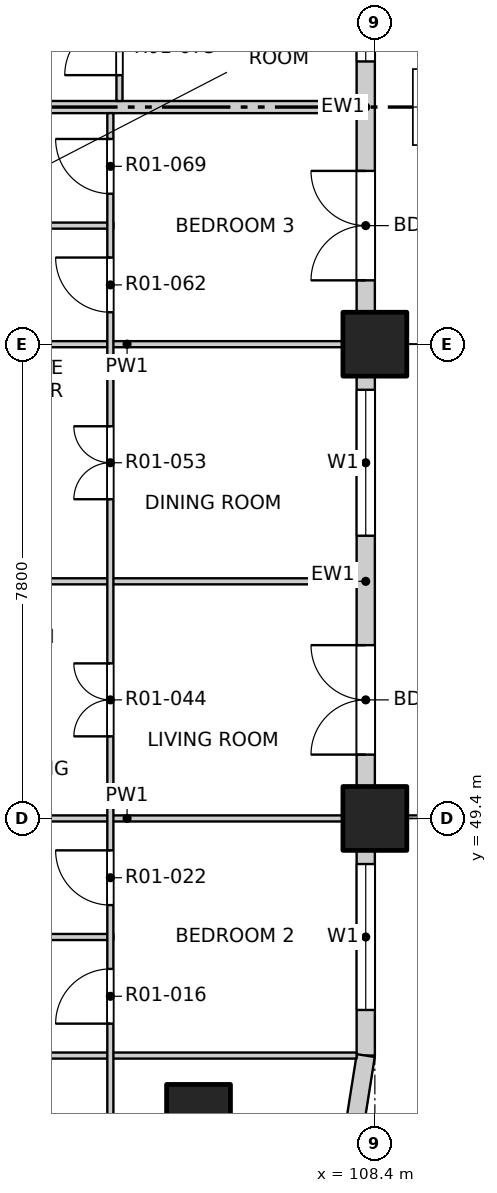
"""IFC4 building model, lengths in metres.
Left out: names, types, materials, properties, quantities, classifications, styles, units other than length and angle.
Written with IfcOpenShell. Run it as: python <this file> out.ifc"""

import sys

from ifc_helpers import new_model, si_unit, direction, frame, frame_2d, origin, origin_2d, place, context, subcontext, project, spatial, rectangle, extrude, element, fill, save


model = new_model("IFC4")
c1 = context("Model", 3, precision=1e-05, world=origin(), true_north=direction((0.0, 1.0)))
c2 = subcontext(c1, "Body", "Model", "MODEL_VIEW")
j1 = project(units=[si_unit("LENGTHUNIT", "METRE"), si_unit("PLANEANGLEUNIT", "RADIAN")], contexts=[c1])
p1 = place(None, origin())
s1 = spatial("IfcSite", under=j1, at=p1, CompositionType="ELEMENT")
p2 = place(p1, origin())
s2 = spatial("IfcBuilding", under=s1, at=p2, CompositionType="ELEMENT")
p3 = place(p2, frame((0.0, 0.0, 19.5)))
s3 = spatial("IfcBuildingStorey", under=s2, at=p3, CompositionType="ELEMENT", Elevation=19.5)
for number, where, z_axis, x_axis in (
    (1, (105.5, 44.5, -0.25), (0.0, 0.0, 1.0), (1.0, 0.0, 0.0)),
    (2, (108.4, 49.4, -0.25), (0.0, 0.0, 1.0), (1.0, 0.0, 0.0)),
    (3, (108.4, 57.2, -0.25), (0.0, 0.0, 1.0), (1.0, 0.0, 0.0)),
):
    element("IfcColumn", number, at=place(p3, frame(where, z_axis=z_axis, x_axis=x_axis)), inside=s3, PredefinedType="COLUMN", context=c2, shape_type="SweptSolid", body=[
        extrude(rectangle(XDim=1.05, YDim=1.05, at=origin_2d()), origin(), (0.0, 0.0, 1.0), 3.4),
    ])
p4 = place(p3, frame((108.25, 45.5, 0.0), z_axis=(0.0, 0.0, 1.0), x_axis=(0.0, 1.0, 0.0)))
e4 = element("IfcWall", 4, at=p4, inside=s3, PredefinedType="SOLIDWALL", context=c2, shape_type="SweptSolid", body=[
    extrude(rectangle(XDim=3.375, YDim=0.3, at=frame_2d((1.688, 0.0))), origin(), (0.0, 0.0, 1.0), 2.7),
])
p5 = place(p4, frame((0.75, 0.0, 0.9)))
e5 = element("IfcOpeningElement", 5, at=p5, cuts=e4, PredefinedType="OPENING", context=c2, shape_type="SweptSolid", body=[
    extrude(rectangle(XDim=2.4, YDim=1.8, at=frame_2d((1.2, 0.9))), frame((0.0, 0.16, 0.0), z_axis=(0.0, -1.0, 0.0), x_axis=(1.0, 0.0, 0.0)), (0.0, 0.0, 1.0), 0.32),
])
p6 = place(p3, frame((108.25, 49.925, 0.0), z_axis=(0.0, 0.0, 1.0), x_axis=(0.0, 1.0, 0.0)))
e6 = element("IfcWall", 6, at=p6, inside=s3, PredefinedType="SOLIDWALL", context=c2, shape_type="SweptSolid", body=[
    extrude(rectangle(XDim=6.75, YDim=0.3, at=frame_2d((3.375, 0.0))), origin(), (0.0, 0.0, 1.0), 2.7),
])
p7 = place(p6, frame((0.525, 0.0, 0.0)))
e7 = element("IfcOpeningElement", 7, at=p7, cuts=e6, PredefinedType="OPENING", context=c2, shape_type="SweptSolid", body=[
    extrude(rectangle(XDim=1.8, YDim=2.4, at=frame_2d((0.9, 1.2))), frame((0.0, 0.16, 0.0), z_axis=(0.0, -1.0, 0.0), x_axis=(1.0, 0.0, 0.0)), (0.0, 0.0, 1.0), 0.32),
])
p8 = place(p6, frame((4.125, 0.0, 0.9)))
e8 = element("IfcOpeningElement", 8, at=p8, cuts=e6, PredefinedType="OPENING", context=c2, shape_type="SweptSolid", body=[
    extrude(rectangle(XDim=2.4, YDim=1.8, at=frame_2d((1.2, 0.9))), frame((0.0, 0.16, 0.0), z_axis=(0.0, -1.0, 0.0), x_axis=(1.0, 0.0, 0.0)), (0.0, 0.0, 1.0), 0.32),
])
p9 = place(p3, frame((108.25, 57.725, 0.0), z_axis=(0.0, 0.0, 1.0), x_axis=(0.0, 1.0, 0.0)))
e9 = element("IfcWall", 9, at=p9, inside=s3, PredefinedType="SOLIDWALL", context=c2, shape_type="SweptSolid", body=[
    extrude(rectangle(XDim=6.75, YDim=0.3, at=frame_2d((3.375, 0.0))), origin(), (0.0, 0.0, 1.0), 2.7),
])
p10 = place(p9, frame((0.525, 0.0, 0.0)))
e10 = element("IfcOpeningElement", 10, at=p10, cuts=e9, PredefinedType="OPENING", context=c2, shape_type="SweptSolid", body=[
    extrude(rectangle(XDim=1.8, YDim=2.4, at=frame_2d((0.9, 1.2))), frame((0.0, 0.16, 0.0), z_axis=(0.0, -1.0, 0.0), x_axis=(1.0, 0.0, 0.0)), (0.0, 0.0, 1.0), 0.32),
])
p11 = place(p9, frame((4.125, 0.0, 0.9)))
e11 = element("IfcOpeningElement", 11, at=p11, cuts=e9, PredefinedType="OPENING", context=c2, shape_type="SweptSolid", body=[
    extrude(rectangle(XDim=2.4, YDim=1.8, at=frame_2d((1.2, 0.9))), frame((0.0, 0.16, 0.0), z_axis=(0.0, -1.0, 0.0), x_axis=(1.0, 0.0, 0.0)), (0.0, 0.0, 1.0), 0.32),
])
p12 = place(p3, frame((108.066, 44.341, 0.0), z_axis=(0.0, 0.0, 1.0), x_axis=(0.156496880861, 0.987678452879, 0.0)))
e12 = element("IfcWall", 12, at=p12, inside=s3, PredefinedType="SOLIDWALL", context=c2, shape_type="SweptSolid", body=[
    extrude(rectangle(XDim=1.173, YDim=0.3, at=frame_2d((0.586, 0.0))), origin(), (0.0, 0.0, 1.0), 2.7),
])
p13 = place(p3, frame((96.6, 45.5, 0.0), z_axis=(0.0, 0.0, 1.0), x_axis=(1.0, 0.0, 0.0)))
e13 = element("IfcWall", 13, at=p13, inside=s3, PredefinedType="PARTITIONING", context=c2, shape_type="SweptSolid", body=[
    extrude(rectangle(XDim=11.5, YDim=0.1, at=frame_2d((5.75, 0.0))), origin(), (0.0, 0.0, 1.0), 3.15),
])
p14 = place(p13, frame((2.635, 0.0, 0.0)))
e14 = element("IfcOpeningElement", 14, at=p14, cuts=e13, PredefinedType="OPENING", context=c2, shape_type="SweptSolid", body=[
    extrude(rectangle(XDim=0.9, YDim=2.1, at=frame_2d((0.45, 1.05))), frame((0.0, 0.06, 0.0), z_axis=(0.0, -1.0, 0.0), x_axis=(1.0, 0.0, 0.0)), (0.0, 0.0, 1.0), 0.12),
])
p15 = place(p3, frame((100.55, 47.45, 0.0), z_axis=(0.0, 0.0, 1.0), x_axis=(1.0, 0.0, 0.0)))
e15 = element("IfcWall", 15, at=p15, inside=s3, PredefinedType="PARTITIONING", context=c2, shape_type="SweptSolid", body=[
    extrude(rectangle(XDim=3.55, YDim=0.1, at=frame_2d((1.775, 0.0))), origin(), (0.0, 0.0, 1.0), 3.15),
])
p16 = place(p3, frame((100.55, 49.4, 0.0), z_axis=(0.0, 0.0, 1.0), x_axis=(1.0, 0.0, 0.0)))
e16 = element("IfcWall", 16, at=p16, inside=s3, PredefinedType="PARTITIONING", context=c2, shape_type="SweptSolid", body=[
    extrude(rectangle(XDim=7.55, YDim=0.1, at=frame_2d((3.775, 0.0))), origin(), (0.0, 0.0, 1.0), 2.55),
])
p17 = place(p3, frame((100.55, 53.3, 0.0), z_axis=(0.0, 0.0, 1.0), x_axis=(1.0, 0.0, 0.0)))
e17 = element("IfcWall", 17, at=p17, inside=s3, PredefinedType="PARTITIONING", context=c2, shape_type="SweptSolid", body=[
    extrude(rectangle(XDim=7.55, YDim=0.1, at=frame_2d((3.775, 0.0))), origin(), (0.0, 0.0, 1.0), 3.15),
])
p18 = place(p3, frame((100.55, 57.2, 0.0), z_axis=(0.0, 0.0, 1.0), x_axis=(1.0, 0.0, 0.0)))
e18 = element("IfcWall", 18, at=p18, inside=s3, PredefinedType="PARTITIONING", context=c2, shape_type="SweptSolid", body=[
    extrude(rectangle(XDim=7.55, YDim=0.1, at=frame_2d((3.775, 0.0))), origin(), (0.0, 0.0, 1.0), 2.55),
])
p19 = place(p3, frame((100.55, 59.15, 0.0), z_axis=(0.0, 0.0, 1.0), x_axis=(1.0, 0.0, 0.0)))
e19 = element("IfcWall", 19, at=p19, inside=s3, PredefinedType="PARTITIONING", context=c2, shape_type="SweptSolid", body=[
    extrude(rectangle(XDim=3.55, YDim=0.1, at=frame_2d((1.775, 0.0))), origin(), (0.0, 0.0, 1.0), 3.15),
])
p20 = place(p3, frame((96.6, 61.1, 0.0), z_axis=(0.0, 0.0, 1.0), x_axis=(1.0, 0.0, 0.0)))
e20 = element("IfcWall", 20, at=p20, inside=s3, PredefinedType="PARTITIONING", context=c2, shape_type="SweptSolid", body=[
    extrude(rectangle(XDim=11.5, YDim=0.2, at=frame_2d((5.75, 0.0))), origin(), (0.0, 0.0, 1.0), 3.15),
])
p21 = place(p3, frame((104.05, 41.9, 0.0), z_axis=(0.0, 0.0, 1.0), x_axis=(0.0, 1.0, 0.0)))
e21 = element("IfcWall", 21, at=p21, inside=s3, PredefinedType="PARTITIONING", context=c2, shape_type="SweptSolid", body=[
    extrude(rectangle(XDim=19.1, YDim=0.1, at=frame_2d((9.55, 0.0))), origin(), (0.0, 0.0, 1.0), 3.15),
])
p22 = place(p21, frame((1.05, 0.0, 0.0)))
e22 = element("IfcOpeningElement", 22, at=p22, cuts=e21, PredefinedType="OPENING", context=c2, shape_type="SweptSolid", body=[
    extrude(rectangle(XDim=1.2, YDim=2.1, at=frame_2d((0.6, 1.05))), frame((0.0, 0.06, 0.0), z_axis=(0.0, -1.0, 0.0), x_axis=(1.0, 0.0, 0.0)), (0.0, 0.0, 1.0), 0.12),
])
p23 = place(p21, frame((4.125, 0.0, 0.0)))
e23 = element("IfcOpeningElement", 23, at=p23, cuts=e21, PredefinedType="OPENING", context=c2, shape_type="SweptSolid", body=[
    extrude(rectangle(XDim=0.9, YDim=2.1, at=frame_2d((0.45, 1.05))), frame((0.0, 0.06, 0.0), z_axis=(0.0, -1.0, 0.0), x_axis=(1.0, 0.0, 0.0)), (0.0, 0.0, 1.0), 0.12),
])
p24 = place(p21, frame((6.075, 0.0, 0.0)))
e24 = element("IfcOpeningElement", 24, at=p24, cuts=e21, PredefinedType="OPENING", context=c2, shape_type="SweptSolid", body=[
    extrude(rectangle(XDim=0.9, YDim=2.1, at=frame_2d((0.45, 1.05))), frame((0.0, 0.06, 0.0), z_axis=(0.0, -1.0, 0.0), x_axis=(1.0, 0.0, 0.0)), (0.0, 0.0, 1.0), 0.12),
])
p25 = place(p21, frame((8.85, 0.0, 0.0)))
e25 = element("IfcOpeningElement", 25, at=p25, cuts=e21, PredefinedType="OPENING", context=c2, shape_type="SweptSolid", body=[
    extrude(rectangle(XDim=1.2, YDim=2.1, at=frame_2d((0.6, 1.05))), frame((0.0, 0.06, 0.0), z_axis=(0.0, -1.0, 0.0), x_axis=(1.0, 0.0, 0.0)), (0.0, 0.0, 1.0), 0.12),
])
p26 = place(p21, frame((12.75, 0.0, 0.0)))
e26 = element("IfcOpeningElement", 26, at=p26, cuts=e21, PredefinedType="OPENING", context=c2, shape_type="SweptSolid", body=[
    extrude(rectangle(XDim=1.2, YDim=2.1, at=frame_2d((0.6, 1.05))), frame((0.0, 0.06, 0.0), z_axis=(0.0, -1.0, 0.0), x_axis=(1.0, 0.0, 0.0)), (0.0, 0.0, 1.0), 0.12),
])
p27 = place(p21, frame((15.825, 0.0, 0.0)))
e27 = element("IfcOpeningElement", 27, at=p27, cuts=e21, PredefinedType="OPENING", context=c2, shape_type="SweptSolid", body=[
    extrude(rectangle(XDim=0.9, YDim=2.1, at=frame_2d((0.45, 1.05))), frame((0.0, 0.06, 0.0), z_axis=(0.0, -1.0, 0.0), x_axis=(1.0, 0.0, 0.0)), (0.0, 0.0, 1.0), 0.12),
])
p28 = place(p21, frame((17.775, 0.0, 0.0)))
e28 = element("IfcOpeningElement", 28, at=p28, cuts=e21, PredefinedType="OPENING", context=c2, shape_type="SweptSolid", body=[
    extrude(rectangle(XDim=0.9, YDim=2.1, at=frame_2d((0.45, 1.05))), frame((0.0, 0.06, 0.0), z_axis=(0.0, -1.0, 0.0), x_axis=(1.0, 0.0, 0.0)), (0.0, 0.0, 1.0), 0.12),
])
p29 = place(p3, frame((104.2, 61.2, 0.0), z_axis=(0.0, 0.0, 1.0), x_axis=(0.0, 1.0, 0.0)))
e29 = element("IfcWall", 29, at=p29, inside=s3, PredefinedType="PARTITIONING", context=c2, shape_type="SweptSolid", body=[
    extrude(rectangle(XDim=15.4, YDim=0.1, at=frame_2d((7.7, 0.0))), origin(), (0.0, 0.0, 1.0), 3.15),
])
p30 = place(p29, frame((0.425, 0.0, 0.0)))
e30 = element("IfcOpeningElement", 30, at=p30, cuts=e29, PredefinedType="OPENING", context=c2, shape_type="SweptSolid", body=[
    extrude(rectangle(XDim=0.9, YDim=2.1, at=frame_2d((0.45, 1.05))), frame((0.0, 0.06, 0.0), z_axis=(0.0, -1.0, 0.0), x_axis=(1.0, 0.0, 0.0)), (0.0, 0.0, 1.0), 0.12),
])
p31 = place(p29, frame((2.375, 0.0, 0.0)))
e31 = element("IfcOpeningElement", 31, at=p31, cuts=e29, PredefinedType="OPENING", context=c2, shape_type="SweptSolid", body=[
    extrude(rectangle(XDim=0.9, YDim=2.1, at=frame_2d((0.45, 1.05))), frame((0.0, 0.06, 0.0), z_axis=(0.0, -1.0, 0.0), x_axis=(1.0, 0.0, 0.0)), (0.0, 0.0, 1.0), 0.12),
])
p32 = place(p29, frame((5.15, 0.0, 0.0)))
e32 = element("IfcOpeningElement", 32, at=p32, cuts=e29, PredefinedType="OPENING", context=c2, shape_type="SweptSolid", body=[
    extrude(rectangle(XDim=1.2, YDim=2.1, at=frame_2d((0.6, 1.05))), frame((0.0, 0.06, 0.0), z_axis=(0.0, -1.0, 0.0), x_axis=(1.0, 0.0, 0.0)), (0.0, 0.0, 1.0), 0.12),
])
p33 = place(p29, frame((8.225, 0.0, 0.0)))
e33 = element("IfcOpeningElement", 33, at=p33, cuts=e29, PredefinedType="OPENING", context=c2, shape_type="SweptSolid", body=[
    extrude(rectangle(XDim=0.9, YDim=2.1, at=frame_2d((0.45, 1.05))), frame((0.0, 0.06, 0.0), z_axis=(0.0, -1.0, 0.0), x_axis=(1.0, 0.0, 0.0)), (0.0, 0.0, 1.0), 0.12),
])
p34 = place(p29, frame((10.175, 0.0, 0.0)))
e34 = element("IfcOpeningElement", 34, at=p34, cuts=e29, PredefinedType="OPENING", context=c2, shape_type="SweptSolid", body=[
    extrude(rectangle(XDim=0.9, YDim=2.1, at=frame_2d((0.45, 1.05))), frame((0.0, 0.06, 0.0), z_axis=(0.0, -1.0, 0.0), x_axis=(1.0, 0.0, 0.0)), (0.0, 0.0, 1.0), 0.12),
])
p35 = place(p29, frame((12.95, 0.0, 0.0)))
e35 = element("IfcOpeningElement", 35, at=p35, cuts=e29, PredefinedType="OPENING", context=c2, shape_type="SweptSolid", body=[
    extrude(rectangle(XDim=1.2, YDim=2.1, at=frame_2d((0.6, 1.05))), frame((0.0, 0.06, 0.0), z_axis=(0.0, -1.0, 0.0), x_axis=(1.0, 0.0, 0.0)), (0.0, 0.0, 1.0), 0.12),
])
p36 = place(p5, origin())
e36 = element("IfcWindow", 36, at=p36, inside=s3, PartitioningType="DOUBLE_PANEL_VERTICAL", PredefinedType="WINDOW", context=c2, shape_type="SweptSolid", body=[
    extrude(rectangle(XDim=2.4, YDim=1.8, at=frame_2d((1.2, 0.9))), frame((0.0, 0.03, 0.0), z_axis=(0.0, -1.0, 0.0), x_axis=(1.0, 0.0, 0.0)), (0.0, 0.0, 1.0), 0.06),
])
fill(e5, e36)
p37 = place(p7, origin())
e37 = element("IfcDoor", 37, at=p37, inside=s3, OperationType="DOUBLE_DOOR_SINGLE_SWING", PredefinedType="DOOR", context=c2, shape_type="SweptSolid", body=[
    extrude(rectangle(XDim=1.8, YDim=2.4, at=frame_2d((0.9, 1.2))), frame((0.0, 0.025, 0.0), z_axis=(0.0, -1.0, 0.0), x_axis=(1.0, 0.0, 0.0)), (0.0, 0.0, 1.0), 0.05),
])
fill(e7, e37)
p38 = place(p8, origin())
e38 = element("IfcWindow", 38, at=p38, inside=s3, PartitioningType="DOUBLE_PANEL_VERTICAL", PredefinedType="WINDOW", context=c2, shape_type="SweptSolid", body=[
    extrude(rectangle(XDim=2.4, YDim=1.8, at=frame_2d((1.2, 0.9))), frame((0.0, 0.03, 0.0), z_axis=(0.0, -1.0, 0.0), x_axis=(1.0, 0.0, 0.0)), (0.0, 0.0, 1.0), 0.06),
])
fill(e8, e38)
p39 = place(p10, origin())
e39 = element("IfcDoor", 39, at=p39, inside=s3, OperationType="DOUBLE_DOOR_SINGLE_SWING", PredefinedType="DOOR", context=c2, shape_type="SweptSolid", body=[
    extrude(rectangle(XDim=1.8, YDim=2.4, at=frame_2d((0.9, 1.2))), frame((0.0, 0.025, 0.0), z_axis=(0.0, -1.0, 0.0), x_axis=(1.0, 0.0, 0.0)), (0.0, 0.0, 1.0), 0.05),
])
fill(e10, e39)
p40 = place(p11, origin())
e40 = element("IfcWindow", 40, at=p40, inside=s3, PartitioningType="DOUBLE_PANEL_VERTICAL", PredefinedType="WINDOW", context=c2, shape_type="SweptSolid", body=[
    extrude(rectangle(XDim=2.4, YDim=1.8, at=frame_2d((1.2, 0.9))), frame((0.0, 0.03, 0.0), z_axis=(0.0, -1.0, 0.0), x_axis=(1.0, 0.0, 0.0)), (0.0, 0.0, 1.0), 0.06),
])
fill(e11, e40)
p41 = place(p23, origin())
e41 = element("IfcDoor", 41, at=p41, inside=s3, OperationType="SINGLE_SWING_LEFT", PredefinedType="DOOR", context=c2, shape_type="SweptSolid", body=[
    extrude(rectangle(XDim=0.9, YDim=2.1, at=frame_2d((0.45, 1.05))), frame((0.0, 0.025, 0.0), z_axis=(0.0, -1.0, 0.0), x_axis=(1.0, 0.0, 0.0)), (0.0, 0.0, 1.0), 0.05),
])
fill(e23, e41)
p42 = place(p24, origin())
e42 = element("IfcDoor", 42, at=p42, inside=s3, OperationType="SINGLE_SWING_RIGHT", PredefinedType="DOOR", context=c2, shape_type="SweptSolid", body=[
    extrude(rectangle(XDim=0.9, YDim=2.1, at=frame_2d((0.45, 1.05))), frame((0.0, 0.025, 0.0), z_axis=(0.0, -1.0, 0.0), x_axis=(1.0, 0.0, 0.0)), (0.0, 0.0, 1.0), 0.05),
])
fill(e24, e42)
p43 = place(p25, origin())
e43 = element("IfcDoor", 43, at=p43, inside=s3, OperationType="DOUBLE_DOOR_SINGLE_SWING", PredefinedType="DOOR", context=c2, shape_type="SweptSolid", body=[
    extrude(rectangle(XDim=1.2, YDim=2.1, at=frame_2d((0.6, 1.05))), frame((0.0, 0.025, 0.0), z_axis=(0.0, -1.0, 0.0), x_axis=(1.0, 0.0, 0.0)), (0.0, 0.0, 1.0), 0.05),
])
fill(e25, e43)
p44 = place(p26, origin())
e44 = element("IfcDoor", 44, at=p44, inside=s3, OperationType="DOUBLE_DOOR_SINGLE_SWING", PredefinedType="DOOR", context=c2, shape_type="SweptSolid", body=[
    extrude(rectangle(XDim=1.2, YDim=2.1, at=frame_2d((0.6, 1.05))), frame((0.0, 0.025, 0.0), z_axis=(0.0, -1.0, 0.0), x_axis=(1.0, 0.0, 0.0)), (0.0, 0.0, 1.0), 0.05),
])
fill(e26, e44)
p45 = place(p27, origin())
e45 = element("IfcDoor", 45, at=p45, inside=s3, OperationType="SINGLE_SWING_RIGHT", PredefinedType="DOOR", context=c2, shape_type="SweptSolid", body=[
    extrude(rectangle(XDim=0.9, YDim=2.1, at=frame_2d((0.45, 1.05))), frame((0.0, 0.025, 0.0), z_axis=(0.0, -1.0, 0.0), x_axis=(1.0, 0.0, 0.0)), (0.0, 0.0, 1.0), 0.05),
])
fill(e27, e45)
p46 = place(p28, origin())
e46 = element("IfcDoor", 46, at=p46, inside=s3, OperationType="SINGLE_SWING_RIGHT", PredefinedType="DOOR", context=c2, shape_type="SweptSolid", body=[
    extrude(rectangle(XDim=0.9, YDim=2.1, at=frame_2d((0.45, 1.05))), frame((0.0, 0.025, 0.0), z_axis=(0.0, -1.0, 0.0), x_axis=(1.0, 0.0, 0.0)), (0.0, 0.0, 1.0), 0.05),
])
fill(e28, e46)
p47 = place(p30, origin())
e47 = element("IfcDoor", 47, at=p47, inside=s3, OperationType="SINGLE_SWING_LEFT", PredefinedType="DOOR", context=c2, shape_type="SweptSolid", body=[
    extrude(rectangle(XDim=0.9, YDim=2.1, at=frame_2d((0.45, 1.05))), frame((0.0, 0.025, 0.0), z_axis=(0.0, -1.0, 0.0), x_axis=(1.0, 0.0, 0.0)), (0.0, 0.0, 1.0), 0.05),
])
fill(e30, e47)
save(model, sys.argv[1])
